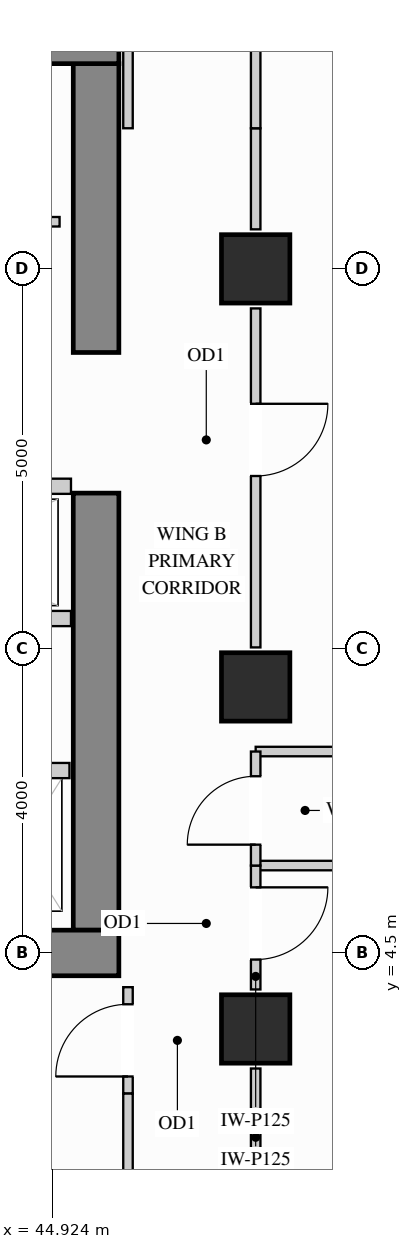
"""IFC4 building model, lengths in metres.
Left out: names, types, materials, properties, quantities, classifications, styles, units other than length and angle.
Written with IfcOpenShell. Run it as: python <this file> out.ifc"""

import sys

from ifc_helpers import new_model, si_unit, direction, frame, frame_2d, origin, origin_2d, place, context, subcontext, project, spatial, rectangle, extrude, source, transform, mapped, element, fill, save


model = new_model("IFC4")
c1 = context("Model", 3, precision=1e-05, world=origin(), true_north=direction((0.0, 1.0)))
c2 = subcontext(c1, "Body", "Model", "MODEL_VIEW")
j1 = project(units=[si_unit("LENGTHUNIT", "METRE"), si_unit("PLANEANGLEUNIT", "RADIAN")], contexts=[c1])
p1 = place(None, origin())
s1 = spatial("IfcSite", under=j1, at=p1, CompositionType="ELEMENT")
p2 = place(p1, origin())
s2 = spatial("IfcBuilding", under=s1, at=p2, CompositionType="ELEMENT")
p3 = place(p2, frame((0.0, 0.0, 157.5)))
s3 = spatial("IfcBuildingStorey", under=s2, at=p3, CompositionType="ELEMENT", Elevation=157.5)
m1 = source(origin(), c2, "Body", "SweptSolid", [
    extrude(rectangle(XDim=0.9, YDim=0.9, at=origin_2d()), origin(), (0.0, 0.0, 1.0), 3.4),
])
for number, where, z_axis, x_axis in (
    (1, (47.6, 13.5, 0.0), (0.0, 0.0, 1.0), (1.0, 0.0, 0.0)),
    (2, (47.6, 3.5, 0.0), (0.0, 0.0, 1.0), (1.0, 0.0, 0.0)),
    (3, (47.6, 8.0, 0.0), (0.0, 0.0, 1.0), (1.0, 0.0, 0.0)),
):
    element("IfcColumn", number, at=place(p3, frame(where, z_axis=z_axis, x_axis=x_axis)), inside=s3, PredefinedType="COLUMN", context=c2, shape_type="MappedRepresentation", body=[
        mapped(m1, transform((0.0, 0.0, 0.0), x_axis=(1.0, 0.0, 0.0), y_axis=(0.0, 1.0, 0.0), z_axis=(0.0, 0.0, 1.0))),
    ])
m2 = source(origin(), c2, "Body", "SweptSolid", [
    extrude(rectangle(XDim=5.75, YDim=0.6, at=frame_2d((2.875, 0.0))), origin(), (0.0, 0.0, 1.0), 3.4),
])
p4 = place(p3, frame((45.5, 4.8, 0.0), z_axis=(0.0, 0.0, 1.0), x_axis=(0.0, 1.0, 0.0)))
e4 = element("IfcWall", 4, at=p4, inside=s3, PredefinedType="SHEAR", context=c2, shape_type="MappedRepresentation", body=[
    mapped(m2, transform((0.0, 0.0, 0.0), x_axis=(1.0, 0.0, 0.0), y_axis=(0.0, 1.0, 0.0), z_axis=(0.0, 0.0, 1.0))),
])
m3 = source(origin(), c2, "Body", "SweptSolid", [
    extrude(rectangle(XDim=3.8, YDim=0.6, at=frame_2d((1.9, 0.0))), origin(), (0.0, 0.0, 1.0), 3.4),
])
p5 = place(p3, frame((45.5, 12.4, 0.0), z_axis=(0.0, 0.0, 1.0), x_axis=(0.0, 1.0, 0.0)))
e5 = element("IfcWall", 5, at=p5, inside=s3, PredefinedType="SHEAR", context=c2, shape_type="MappedRepresentation", body=[
    mapped(m3, transform((0.0, 0.0, 0.0), x_axis=(1.0, 0.0, 0.0), y_axis=(0.0, 1.0, 0.0), z_axis=(0.0, 0.0, 1.0))),
])
m4 = source(origin(), c2, "Body", "SweptSolid", [
    extrude(rectangle(XDim=10.1, YDim=0.6, at=frame_2d((5.05, 0.0))), origin(), (0.0, 0.0, 1.0), 3.4),
])
for number, where, z_axis, x_axis in (
    (6, (35.7, 16.5, 0.0), (0.0, 0.0, 1.0), (1.0, 0.0, 0.0)),
    (7, (35.7, 4.5, 0.0), (0.0, 0.0, 1.0), (1.0, 0.0, 0.0)),
):
    element("IfcWall", number, at=place(p3, frame(where, z_axis=z_axis, x_axis=x_axis)), inside=s3, PredefinedType="SHEAR", context=c2, shape_type="MappedRepresentation", body=[
        mapped(m4, transform((0.0, 0.0, 0.0), x_axis=(1.0, 0.0, 0.0), y_axis=(0.0, 1.0, 0.0), z_axis=(0.0, 0.0, 1.0))),
    ])
p6 = place(p3, frame((36.5, 14.12, 0.0), z_axis=(0.0, 0.0, 1.0), x_axis=(1.0, 0.0, 0.0)))
e8 = element("IfcWall", 8, at=p6, inside=s3, PredefinedType="PARTITIONING", context=c2, shape_type="SweptSolid", body=[
    extrude(rectangle(XDim=8.52, YDim=0.125, at=frame_2d((4.26, 0.0))), origin(), (0.0, 0.0, 1.0), 3.385),
])
p7 = place(p6, frame((3.785, 0.0, 0.0)))
e9 = element("IfcOpeningElement", 9, at=p7, cuts=e8, PredefinedType="OPENING", context=c2, shape_type="SweptSolid", body=[
    extrude(rectangle(XDim=0.95, YDim=2.15, at=frame_2d((0.475, 1.075))), frame((0.0, 0.073, 0.0), z_axis=(0.0, -1.0, 0.0), x_axis=(1.0, 0.0, 0.0)), (0.0, 0.0, 1.0), 0.145),
])
m5 = source(origin(), c2, "Body", "SweptSolid", [
    extrude(rectangle(XDim=5.048, YDim=0.125, at=frame_2d((2.524, 0.0))), origin(), (0.0, 0.0, 1.0), 3.385),
])
for number, where, z_axis, x_axis in (
    (10, (47.6, 5.65, 0.0), (0.0, 0.0, 1.0), (1.0, 0.0, 0.0)),
    (11, (47.6, 7.15, 0.0), (0.0, 0.0, 1.0), (1.0, 0.0, 0.0)),
):
    element("IfcWall", number, at=place(p3, frame(where, z_axis=z_axis, x_axis=x_axis)), inside=s3, PredefinedType="PARTITIONING", context=c2, shape_type="MappedRepresentation", body=[
        mapped(m5, transform((0.0, 0.0, 0.0), x_axis=(1.0, 0.0, 0.0), y_axis=(0.0, 1.0, 0.0), z_axis=(0.0, 0.0, 1.0))),
    ])
p8 = place(p3, frame((47.6, 4.02, 0.0), z_axis=(0.0, 0.0, 1.0), x_axis=(0.0, 1.0, 0.0)))
e12 = element("IfcWall", 12, at=p8, inside=s3, PredefinedType="PARTITIONING", context=c2, shape_type="SweptSolid", body=[
    extrude(rectangle(XDim=1.63, YDim=0.125, at=frame_2d((0.815, 0.0))), origin(), (0.0, 0.0, 1.0), 2.773),
])
p9 = place(p8, frame((0.393, 0.0, 0.0)))
e13 = element("IfcOpeningElement", 13, at=p9, cuts=e12, PredefinedType="OPENING", context=c2, shape_type="SweptSolid", body=[
    extrude(rectangle(XDim=0.95, YDim=2.15, at=frame_2d((0.475, 1.075))), frame((0.0, 0.073, 0.0), z_axis=(0.0, -1.0, 0.0), x_axis=(1.0, 0.0, 0.0)), (0.0, 0.0, 1.0), 0.145),
])
m6 = source(origin(), c2, "Body", "SweptSolid", [
    extrude(rectangle(XDim=1.86, YDim=0.125, at=frame_2d((0.93, 0.0))), origin(), (0.0, 0.0, 1.0), 2.773),
])
p10 = place(p3, frame((47.6, 1.12, 0.0), z_axis=(0.0, 0.0, 1.0), x_axis=(0.0, 1.0, 0.0)))
e14 = element("IfcWall", 14, at=p10, inside=s3, PredefinedType="PARTITIONING", context=c2, shape_type="MappedRepresentation", body=[
    mapped(m6, transform((0.0, 0.0, 0.0), x_axis=(1.0, 0.0, 0.0), y_axis=(0.0, 1.0, 0.0), z_axis=(0.0, 0.0, 1.0))),
])
p11 = place(p3, frame((47.6, 8.52, 0.0), z_axis=(0.0, 0.0, 1.0), x_axis=(0.0, 1.0, 0.0)))
e15 = element("IfcWall", 15, at=p11, inside=s3, PredefinedType="PARTITIONING", context=c2, shape_type="SweptSolid", body=[
    extrude(rectangle(XDim=4.46, YDim=0.125, at=frame_2d((2.23, 0.0))), origin(), (0.0, 0.0, 1.0), 2.773),
])
p12 = place(p11, frame((2.255, 0.0, 0.0)))
e16 = element("IfcOpeningElement", 16, at=p12, cuts=e15, PredefinedType="OPENING", context=c2, shape_type="SweptSolid", body=[
    extrude(rectangle(XDim=0.95, YDim=2.15, at=frame_2d((0.475, 1.075))), frame((0.0, 0.073, 0.0), z_axis=(0.0, -1.0, 0.0), x_axis=(1.0, 0.0, 0.0)), (0.0, 0.0, 1.0), 0.145),
])
m7 = source(origin(), c2, "Body", "SweptSolid", [
    extrude(rectangle(XDim=1.33, YDim=0.125, at=frame_2d((0.665, 0.0))), origin(), (0.0, 0.0, 1.0), 2.773),
])
p13 = place(p3, frame((47.6, 14.02, 0.0), z_axis=(0.0, 0.0, 1.0), x_axis=(0.0, 1.0, 0.0)))
e17 = element("IfcWall", 17, at=p13, inside=s3, PredefinedType="PARTITIONING", context=c2, shape_type="MappedRepresentation", body=[
    mapped(m7, transform((0.0, 0.0, 0.0), x_axis=(1.0, 0.0, 0.0), y_axis=(0.0, 1.0, 0.0), z_axis=(0.0, 0.0, 1.0))),
])
m8 = source(origin(), c2, "Body", "SweptSolid", [
    extrude(rectangle(XDim=1.53, YDim=0.125, at=frame_2d((0.765, 0.0))), origin(), (0.0, 0.0, 1.0), 2.773),
])
p14 = place(p3, frame((47.6, 15.35, 0.0), z_axis=(0.0, 0.0, 1.0), x_axis=(0.0, 1.0, 0.0)))
e18 = element("IfcWall", 18, at=p14, inside=s3, PredefinedType="PARTITIONING", context=c2, shape_type="MappedRepresentation", body=[
    mapped(m8, transform((0.0, 0.0, 0.0), x_axis=(1.0, 0.0, 0.0), y_axis=(0.0, 1.0, 0.0), z_axis=(0.0, 0.0, 1.0))),
])
p15 = place(p3, frame((47.6, 5.65, 0.0), z_axis=(0.0, 0.0, 1.0), x_axis=(0.0, 1.0, 0.0)))
e19 = element("IfcWall", 19, at=p15, inside=s3, PredefinedType="PARTITIONING", context=c2, shape_type="SweptSolid", body=[
    extrude(rectangle(XDim=1.5, YDim=0.125, at=frame_2d((0.75, 0.0))), origin(), (0.0, 0.0, 1.0), 2.773),
])
p16 = place(p15, frame((0.275, 0.0, 0.0)))
e20 = element("IfcOpeningElement", 20, at=p16, cuts=e19, PredefinedType="OPENING", context=c2, shape_type="SweptSolid", body=[
    extrude(rectangle(XDim=0.9, YDim=2.15, at=frame_2d((0.45, 1.075))), frame((0.0, 0.073, 0.0), z_axis=(0.0, -1.0, 0.0), x_axis=(1.0, 0.0, 0.0)), (0.0, 0.0, 1.0), 0.145),
])
m9 = source(origin(), c2, "Body", "SweptSolid", [
    extrude(rectangle(XDim=2.298, YDim=0.125, at=frame_2d((1.149, 0.0))), origin(), (0.0, 0.0, 1.0), 3.385),
])
p17 = place(p3, frame((45.92, 15.35, 0.0), z_axis=(0.0, 0.0, 1.0), x_axis=(0.0, 1.0, 0.0)))
e21 = element("IfcWall", 21, at=p17, inside=s3, PredefinedType="PARTITIONING", context=c2, shape_type="MappedRepresentation", body=[
    mapped(m9, transform((0.0, 0.0, 0.0), x_axis=(1.0, 0.0, 0.0), y_axis=(0.0, 1.0, 0.0), z_axis=(0.0, 0.0, 1.0))),
])
p18 = place(p3, frame((45.92, 2.65, 0.0), z_axis=(0.0, 0.0, 1.0), x_axis=(0.0, 1.0, 0.0)))
e22 = element("IfcWall", 22, at=p18, inside=s3, PredefinedType="PARTITIONING", context=c2, shape_type="SweptSolid", body=[
    extrude(rectangle(XDim=1.4, YDim=0.125, at=frame_2d((0.7, 0.0))), origin(), (0.0, 0.0, 1.0), 3.385),
])
p19 = place(p18, frame((0.225, 0.0, 0.0)))
e23 = element("IfcOpeningElement", 23, at=p19, cuts=e22, PredefinedType="OPENING", context=c2, shape_type="SweptSolid", body=[
    extrude(rectangle(XDim=0.95, YDim=2.15, at=frame_2d((0.475, 1.075))), frame((0.0, 0.073, 0.0), z_axis=(0.0, -1.0, 0.0), x_axis=(1.0, 0.0, 0.0)), (0.0, 0.0, 1.0), 0.145),
])
p20 = place(p3, frame((45.92, 0.352, 0.0), z_axis=(0.0, 0.0, 1.0), x_axis=(0.0, 1.0, 0.0)))
e24 = element("IfcWall", 24, at=p20, inside=s3, PredefinedType="PARTITIONING", context=c2, shape_type="MappedRepresentation", body=[
    mapped(m9, transform((0.0, 0.0, 0.0), x_axis=(1.0, 0.0, 0.0), y_axis=(0.0, 1.0, 0.0), z_axis=(0.0, 0.0, 1.0))),
])
m10 = source(origin(), c2, "Body", "SweptSolid", [
    extrude(rectangle(XDim=1.3, YDim=0.2, at=frame_2d((0.65, 0.0))), origin(), (0.0, 0.0, 1.0), 3.385),
])
p21 = place(p3, frame((43.85, 6.9, 0.0), z_axis=(0.0, 0.0, 1.0), x_axis=(1.0, 0.0, 0.0)))
e25 = element("IfcWall", 25, at=p21, inside=s3, PredefinedType="PARTITIONING", context=c2, shape_type="MappedRepresentation", body=[
    mapped(m10, transform((0.0, 0.0, 0.0), x_axis=(1.0, 0.0, 0.0), y_axis=(0.0, 1.0, 0.0), z_axis=(0.0, 0.0, 1.0))),
])
m11 = source(origin(), c2, "Body", "SweptSolid", [
    extrude(rectangle(XDim=3.49, YDim=0.2, at=frame_2d((1.745, 0.0))), origin(), (0.0, 0.0, 1.0), 3.385),
])
for number, where, z_axis, x_axis in (
    (26, (41.68, 10.64, 0.0), (0.0, 0.0, 1.0), (1.0, 0.0, 0.0)),
    (27, (41.68, 8.9, 0.0), (0.0, 0.0, 1.0), (1.0, 0.0, 0.0)),
):
    element("IfcWall", number, at=place(p3, frame(where, z_axis=z_axis, x_axis=x_axis)), inside=s3, PredefinedType="PARTITIONING", context=c2, shape_type="MappedRepresentation", body=[
        mapped(m11, transform((0.0, 0.0, 0.0), x_axis=(1.0, 0.0, 0.0), y_axis=(0.0, 1.0, 0.0), z_axis=(0.0, 0.0, 1.0))),
    ])
m12 = source(origin(), c2, "Body", "SweptSolid", [
    extrude(rectangle(XDim=0.95, YDim=2.15, at=frame_2d((0.475, 1.075))), frame((0.0, 0.025, 0.0), z_axis=(0.0, -1.0, 0.0), x_axis=(1.0, 0.0, 0.0)), (0.0, 0.0, 1.0), 0.05),
])
p22 = place(p19, origin())
e28 = element("IfcDoor", 28, at=p22, inside=s3, OperationType="SINGLE_SWING_LEFT", PredefinedType="DOOR", context=c2, shape_type="MappedRepresentation", body=[
    mapped(m12, transform((0.0, 0.0, 0.0), x_axis=(1.0, 0.0, 0.0), y_axis=(0.0, 1.0, 0.0), z_axis=(0.0, 0.0, 1.0))),
])
fill(e23, e28)
p23 = place(p9, origin())
e29 = element("IfcDoor", 29, at=p23, inside=s3, OperationType="SINGLE_SWING_RIGHT", PredefinedType="DOOR", context=c2, shape_type="MappedRepresentation", body=[
    mapped(m12, transform((0.0, 0.0, 0.0), x_axis=(1.0, 0.0, 0.0), y_axis=(0.0, 1.0, 0.0), z_axis=(0.0, 0.0, 1.0))),
])
fill(e13, e29)
p24 = place(p12, origin())
e30 = element("IfcDoor", 30, at=p24, inside=s3, OperationType="SINGLE_SWING_RIGHT", PredefinedType="DOOR", context=c2, shape_type="MappedRepresentation", body=[
    mapped(m12, transform((0.0, 0.0, 0.0), x_axis=(1.0, 0.0, 0.0), y_axis=(0.0, 1.0, 0.0), z_axis=(0.0, 0.0, 1.0))),
])
fill(e16, e30)
m13 = source(origin(), c2, "Body", "SweptSolid", [
    extrude(rectangle(XDim=0.9, YDim=2.15, at=frame_2d((0.45, 1.075))), frame((0.0, 0.025, 0.0), z_axis=(0.0, -1.0, 0.0), x_axis=(1.0, 0.0, 0.0)), (0.0, 0.0, 1.0), 0.05),
])
p25 = place(p16, origin())
e31 = element("IfcDoor", 31, at=p25, inside=s3, OperationType="SINGLE_SWING_LEFT", PredefinedType="DOOR", context=c2, shape_type="MappedRepresentation", body=[
    mapped(m13, transform((0.0, 0.0, 0.0), x_axis=(1.0, 0.0, 0.0), y_axis=(0.0, 1.0, 0.0), z_axis=(0.0, 0.0, 1.0))),
])
fill(e20, e31)
save(model, sys.argv[1])
